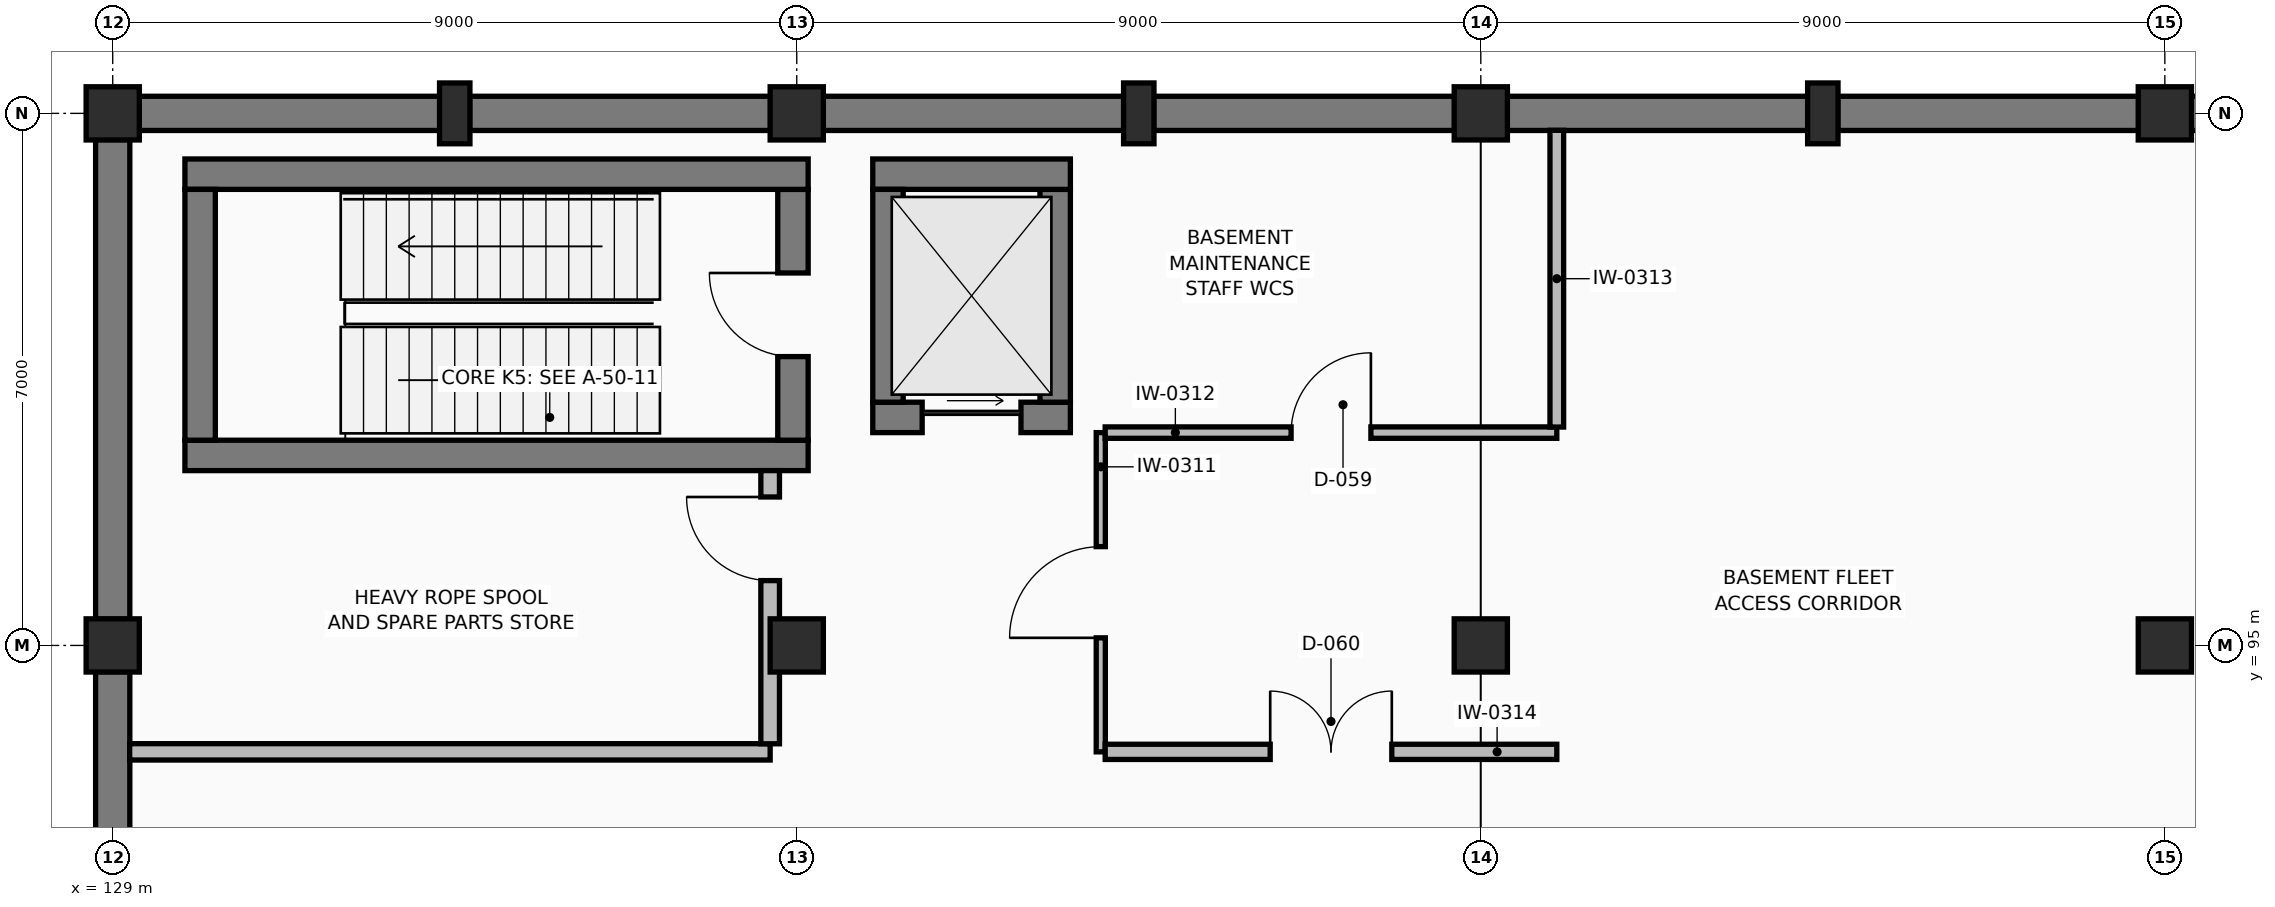
"""IFC4 building model, lengths in metres.
Left out: names, types, materials, properties, quantities, classifications, styles, units other than length and angle.
Written with IfcOpenShell. Run it as: python <this file> out.ifc"""

import sys

from ifc_helpers import new_model, si_unit, direction, frame, frame_2d, origin, origin_2d, place, context, subcontext, project, spatial, rectangle, extrude, element, fill, save


model = new_model("IFC4")
c1 = context("Model", 3, precision=1e-05, world=origin(), true_north=direction((0.0, 1.0)))
c2 = subcontext(c1, "Body", "Model", "MODEL_VIEW")
j1 = project(units=[si_unit("LENGTHUNIT", "METRE"), si_unit("PLANEANGLEUNIT", "RADIAN")], contexts=[c1])
p1 = place(None, origin())
s1 = spatial("IfcSite", under=j1, at=p1, CompositionType="ELEMENT")
p2 = place(p1, origin())
s2 = spatial("IfcBuilding", under=s1, at=p2, CompositionType="ELEMENT")
p3 = place(p2, frame((0.0, 0.0, -4.5)))
s3 = spatial("IfcBuildingStorey", under=s2, at=p3, CompositionType="ELEMENT", Elevation=-4.5)
for number, where, z_axis, x_axis in (
    (1, (129.0, 95.0, 0.0), (0.0, 0.0, 1.0), (1.0, 0.0, 0.0)),
    (2, (129.0, 102.0, 0.0), (0.0, 0.0, 1.0), (1.0, 0.0, 0.0)),
    (3, (138.0, 95.0, 0.0), (0.0, 0.0, 1.0), (1.0, 0.0, 0.0)),
    (4, (138.0, 102.0, 0.0), (0.0, 0.0, 1.0), (1.0, 0.0, 0.0)),
    (5, (147.0, 95.0, 0.0), (0.0, 0.0, 1.0), (1.0, 0.0, 0.0)),
    (6, (147.0, 102.0, 0.0), (0.0, 0.0, 1.0), (1.0, 0.0, 0.0)),
    (7, (156.0, 95.0, 0.0), (0.0, 0.0, 1.0), (1.0, 0.0, 0.0)),
    (8, (156.0, 102.0, 0.0), (0.0, 0.0, 1.0), (1.0, 0.0, 0.0)),
):
    element("IfcColumn", number, at=place(p3, frame(where, z_axis=z_axis, x_axis=x_axis)), inside=s3, PredefinedType="COLUMN", context=c2, shape_type="SweptSolid", body=[
        extrude(rectangle(XDim=0.7, YDim=0.7, at=origin_2d()), origin(), (0.0, 0.0, 1.0), 4.5),
    ])
for number, where, z_axis, x_axis in (
    (9, (133.5, 102.0, 0.0), (0.0, 0.0, 1.0), (1.0, 0.0, 0.0)),
    (10, (142.5, 102.0, 0.0), (0.0, 0.0, 1.0), (1.0, 0.0, 0.0)),
    (11, (151.5, 102.0, 0.0), (0.0, 0.0, 1.0), (1.0, 0.0, 0.0)),
):
    element("IfcColumn", number, at=place(p3, frame(where, z_axis=z_axis, x_axis=x_axis)), inside=s3, PredefinedType="PILASTER", context=c2, shape_type="SweptSolid", body=[
        extrude(rectangle(XDim=0.4, YDim=0.8, at=origin_2d()), origin(), (0.0, 0.0, 1.0), 4.5),
    ])
for number, where, z_axis, x_axis in (
    (12, (160.305, 102.0, 0.0), (0.0, 0.0, 1.0), (-1.0, 0.0, 0.0)),
    (13, (155.655, 102.0, 0.0), (0.0, 0.0, 1.0), (-1.0, 0.0, 0.0)),
    (14, (151.305, 102.0, 0.0), (0.0, 0.0, 1.0), (-1.0, 0.0, 0.0)),
    (15, (146.655, 102.0, 0.0), (0.0, 0.0, 1.0), (-1.0, 0.0, 0.0)),
    (16, (142.305, 102.0, 0.0), (0.0, 0.0, 1.0), (-1.0, 0.0, 0.0)),
    (17, (137.655, 102.0, 0.0), (0.0, 0.0, 1.0), (-1.0, 0.0, 0.0)),
    (18, (133.305, 102.0, 0.0), (0.0, 0.0, 1.0), (-1.0, 0.0, 0.0)),
):
    element("IfcWall", number, at=place(p3, frame(where, z_axis=z_axis, x_axis=x_axis)), inside=s3, PredefinedType="USERDEFINED", context=c2, shape_type="SweptSolid", body=[
        extrude(rectangle(XDim=3.96, YDim=0.45, at=frame_2d((1.98, 0.0))), origin(), (0.0, 0.0, 1.0), 3.775),
    ])
p4 = place(p3, frame((129.0, 101.655, 0.0), z_axis=(0.0, 0.0, 1.0), x_axis=(0.0, -1.0, 0.0)))
e19 = element("IfcWall", 19, at=p4, inside=s3, PredefinedType="USERDEFINED", context=c2, shape_type="SweptSolid", body=[
    extrude(rectangle(XDim=6.31, YDim=0.45, at=frame_2d((3.155, 0.0))), origin(), (0.0, 0.0, 1.0), 3.775),
])
p5 = place(p3, frame((129.0, 94.655, 0.0), z_axis=(0.0, 0.0, 1.0), x_axis=(0.0, -1.0, 0.0)))
e20 = element("IfcWall", 20, at=p5, inside=s3, PredefinedType="USERDEFINED", context=c2, shape_type="SweptSolid", body=[
    extrude(rectangle(XDim=3.96, YDim=0.45, at=frame_2d((1.98, 0.0))), origin(), (0.0, 0.0, 1.0), 3.775),
])
p6 = place(p3, frame((129.95, 97.5, 0.0), z_axis=(0.0, 0.0, 1.0), x_axis=(1.0, 0.0, 0.0)))
e21 = element("IfcWall", 21, at=p6, inside=s3, PredefinedType="SHEAR", context=c2, shape_type="SweptSolid", body=[
    extrude(rectangle(XDim=8.2, YDim=0.4, at=frame_2d((4.1, 0.0))), origin(), (0.0, 0.0, 1.0), 4.19),
])
p7 = place(p3, frame((137.95, 97.7, 0.0), z_axis=(0.0, 0.0, 1.0), x_axis=(0.0, 1.0, 0.0)))
e22 = element("IfcWall", 22, at=p7, inside=s3, PredefinedType="SHEAR", context=c2, shape_type="SweptSolid", body=[
    extrude(rectangle(XDim=3.3, YDim=0.4, at=frame_2d((1.65, 0.0))), origin(), (0.0, 0.0, 1.0), 4.19),
])
p8 = place(p7, frame((1.1, 0.0, 0.0)))
e23 = element("IfcOpeningElement", 23, at=p8, cuts=e22, PredefinedType="OPENING", context=c2, shape_type="SweptSolid", body=[
    extrude(rectangle(XDim=1.1, YDim=2.2, at=frame_2d((0.55, 1.1))), frame((0.0, 0.21, 0.0), z_axis=(0.0, -1.0, 0.0), x_axis=(1.0, 0.0, 0.0)), (0.0, 0.0, 1.0), 0.42),
])
p9 = place(p3, frame((138.15, 101.2, 0.0), z_axis=(0.0, 0.0, 1.0), x_axis=(-1.0, 0.0, 0.0)))
e24 = element("IfcWall", 24, at=p9, inside=s3, PredefinedType="SHEAR", context=c2, shape_type="SweptSolid", body=[
    extrude(rectangle(XDim=8.2, YDim=0.4, at=frame_2d((4.1, 0.0))), origin(), (0.0, 0.0, 1.0), 4.19),
])
p10 = place(p3, frame((130.15, 101.0, 0.0), z_axis=(0.0, 0.0, 1.0), x_axis=(0.0, -1.0, 0.0)))
e25 = element("IfcWall", 25, at=p10, inside=s3, PredefinedType="SHEAR", context=c2, shape_type="SweptSolid", body=[
    extrude(rectangle(XDim=3.3, YDim=0.4, at=frame_2d((1.65, 0.0))), origin(), (0.0, 0.0, 1.0), 4.19),
])
p11 = place(p3, frame((139.0, 98.0, 0.0), z_axis=(0.0, 0.0, 1.0), x_axis=(1.0, 0.0, 0.0)))
e26 = element("IfcWall", 26, at=p11, inside=s3, PredefinedType="SHEAR", context=c2, shape_type="SweptSolid", body=[
    extrude(rectangle(XDim=2.6, YDim=0.4, at=frame_2d((1.3, 0.0))), origin(), (0.0, 0.0, 1.0), 4.19),
])
p12 = place(p11, frame((0.65, 0.0, 0.0)))
e27 = element("IfcOpeningElement", 27, at=p12, cuts=e26, PredefinedType="OPENING", context=c2, shape_type="SweptSolid", body=[
    extrude(rectangle(XDim=1.3, YDim=2.25, at=frame_2d((0.65, 1.125))), frame((0.0, 0.21, 0.0), z_axis=(0.0, -1.0, 0.0), x_axis=(1.0, 0.0, 0.0)), (0.0, 0.0, 1.0), 0.42),
])
p13 = place(p3, frame((141.4, 98.2, 0.0), z_axis=(0.0, 0.0, 1.0), x_axis=(0.0, 1.0, 0.0)))
e28 = element("IfcWall", 28, at=p13, inside=s3, PredefinedType="SHEAR", context=c2, shape_type="SweptSolid", body=[
    extrude(rectangle(XDim=2.8, YDim=0.4, at=frame_2d((1.4, 0.0))), origin(), (0.0, 0.0, 1.0), 4.19),
])
p14 = place(p3, frame((141.6, 101.2, 0.0), z_axis=(0.0, 0.0, 1.0), x_axis=(-1.0, 0.0, 0.0)))
e29 = element("IfcWall", 29, at=p14, inside=s3, PredefinedType="SHEAR", context=c2, shape_type="SweptSolid", body=[
    extrude(rectangle(XDim=2.6, YDim=0.4, at=frame_2d((1.3, 0.0))), origin(), (0.0, 0.0, 1.0), 4.19),
])
p15 = place(p3, frame((139.2, 101.0, 0.0), z_axis=(0.0, 0.0, 1.0), x_axis=(0.0, -1.0, 0.0)))
e30 = element("IfcWall", 30, at=p15, inside=s3, PredefinedType="SHEAR", context=c2, shape_type="SweptSolid", body=[
    extrude(rectangle(XDim=2.8, YDim=0.4, at=frame_2d((1.4, 0.0))), origin(), (0.0, 0.0, 1.0), 4.19),
])
p16 = place(p3, frame((129.223, 93.6, 0.0), z_axis=(0.0, 0.0, 1.0), x_axis=(1.0, 0.0, 0.0)))
e31 = element("IfcWall", 31, at=p16, inside=s3, PredefinedType="PARTITIONING", context=c2, shape_type="SweptSolid", body=[
    extrude(rectangle(XDim=8.427, YDim=0.215, at=frame_2d((4.213, 0.0))), origin(), (0.0, 0.0, 1.0), 4.135),
])
p17 = place(p3, frame((137.65, 93.706, 0.0), z_axis=(0.0, 0.0, 1.0), x_axis=(0.0, 1.0, 0.0)))
e32 = element("IfcWall", 32, at=p17, inside=s3, PredefinedType="PARTITIONING", context=c2, shape_type="SweptSolid", body=[
    extrude(rectangle(XDim=3.594, YDim=0.245, at=frame_2d((1.797, 0.0))), origin(), (0.0, 0.0, 1.0), 3.363),
])
p18 = place(p17, frame((2.147, 0.0, 0.0)))
e33 = element("IfcOpeningElement", 33, at=p18, cuts=e32, PredefinedType="OPENING", context=c2, shape_type="SweptSolid", body=[
    extrude(rectangle(XDim=1.1, YDim=2.2, at=frame_2d((0.55, 1.1))), frame((0.0, 0.133, 0.0), z_axis=(0.0, -1.0, 0.0), x_axis=(1.0, 0.0, 0.0)), (0.0, 0.0, 1.0), 0.265),
])
p19 = place(p3, frame((142.0, 93.6, 0.0), z_axis=(0.0, 0.0, 1.0), x_axis=(0.0, 1.0, 0.0)))
e34 = element("IfcWall", 34, at=p19, inside=s3, PredefinedType="PARTITIONING", context=c2, shape_type="SweptSolid", body=[
    extrude(rectangle(XDim=4.2, YDim=0.12, at=frame_2d((2.1, 0.0))), origin(), (0.0, 0.0, 1.0), 3.363),
])
p20 = place(p19, frame((1.5, 0.0, 0.0)))
e35 = element("IfcOpeningElement", 35, at=p20, cuts=e34, PredefinedType="OPENING", context=c2, shape_type="SweptSolid", body=[
    extrude(rectangle(XDim=1.2, YDim=2.2, at=frame_2d((0.6, 1.1))), frame((0.0, 0.07, 0.0), z_axis=(0.0, -1.0, 0.0), x_axis=(1.0, 0.0, 0.0)), (0.0, 0.0, 1.0), 0.14),
])
p21 = place(p3, frame((142.058, 97.8, 0.0), z_axis=(0.0, 0.0, 1.0), x_axis=(1.0, 0.0, 0.0)))
e36 = element("IfcWall", 36, at=p21, inside=s3, PredefinedType="PARTITIONING", context=c2, shape_type="SweptSolid", body=[
    extrude(rectangle(XDim=5.942, YDim=0.15, at=frame_2d((2.971, 0.0))), origin(), (0.0, 0.0, 1.0), 3.363),
])
p22 = place(p21, frame((2.446, 0.0, 0.0)))
e37 = element("IfcOpeningElement", 37, at=p22, cuts=e36, PredefinedType="OPENING", context=c2, shape_type="SweptSolid", body=[
    extrude(rectangle(XDim=1.05, YDim=2.15, at=frame_2d((0.525, 1.075))), frame((0.0, 0.085, 0.0), z_axis=(0.0, -1.0, 0.0), x_axis=(1.0, 0.0, 0.0)), (0.0, 0.0, 1.0), 0.17),
])
p23 = place(p3, frame((148.0, 97.873, 0.0), z_axis=(0.0, 0.0, 1.0), x_axis=(0.0, 1.0, 0.0)))
e38 = element("IfcWall", 38, at=p23, inside=s3, PredefinedType="STANDARD", context=c2, shape_type="SweptSolid", body=[
    extrude(rectangle(XDim=3.904, YDim=0.18, at=frame_2d((1.952, 0.0))), origin(), (0.0, 0.0, 1.0), 4.135),
])
p24 = place(p3, frame((142.058, 93.6, 0.0), z_axis=(0.0, 0.0, 1.0), x_axis=(1.0, 0.0, 0.0)))
e39 = element("IfcWall", 39, at=p24, inside=s3, PredefinedType="PARTITIONING", context=c2, shape_type="SweptSolid", body=[
    extrude(rectangle(XDim=5.942, YDim=0.2, at=frame_2d((2.971, 0.0))), origin(), (0.0, 0.0, 1.0), 3.363),
])
p25 = place(p24, frame((2.171, 0.0, 0.0)))
e40 = element("IfcOpeningElement", 40, at=p25, cuts=e39, PredefinedType="OPENING", context=c2, shape_type="SweptSolid", body=[
    extrude(rectangle(XDim=1.6, YDim=2.25, at=frame_2d((0.8, 1.125))), frame((0.0, 0.11, 0.0), z_axis=(0.0, -1.0, 0.0), x_axis=(1.0, 0.0, 0.0)), (0.0, 0.0, 1.0), 0.22),
])
p26 = place(p8, origin())
e41 = element("IfcDoor", 41, at=p26, inside=s3, OperationType="SINGLE_SWING_RIGHT", PredefinedType="DOOR", context=c2, shape_type="SweptSolid", body=[
    extrude(rectangle(XDim=1.1, YDim=2.2, at=frame_2d((0.55, 1.1))), frame((0.0, 0.025, 0.0), z_axis=(0.0, -1.0, 0.0), x_axis=(1.0, 0.0, 0.0)), (0.0, 0.0, 1.0), 0.05),
])
fill(e23, e41)
p27 = place(p12, origin())
e42 = element("IfcDoor", 42, at=p27, inside=s3, OperationType="SLIDING_TO_RIGHT", PredefinedType="DOOR", context=c2, shape_type="SweptSolid", body=[
    extrude(rectangle(XDim=1.3, YDim=2.25, at=frame_2d((0.65, 1.125))), frame((0.0, 0.025, 0.0), z_axis=(0.0, -1.0, 0.0), x_axis=(1.0, 0.0, 0.0)), (0.0, 0.0, 1.0), 0.05),
])
fill(e27, e42)
p28 = place(p18, origin())
e43 = element("IfcDoor", 43, at=p28, inside=s3, OperationType="SINGLE_SWING_RIGHT", PredefinedType="DOOR", context=c2, shape_type="SweptSolid", body=[
    extrude(rectangle(XDim=1.1, YDim=2.2, at=frame_2d((0.55, 1.1))), frame((0.0, 0.025, 0.0), z_axis=(0.0, -1.0, 0.0), x_axis=(1.0, 0.0, 0.0)), (0.0, 0.0, 1.0), 0.05),
])
fill(e33, e43)
p29 = place(p20, origin())
e44 = element("IfcDoor", 44, at=p29, inside=s3, OperationType="SINGLE_SWING_LEFT", PredefinedType="DOOR", context=c2, shape_type="SweptSolid", body=[
    extrude(rectangle(XDim=1.2, YDim=2.2, at=frame_2d((0.6, 1.1))), frame((0.0, 0.025, 0.0), z_axis=(0.0, -1.0, 0.0), x_axis=(1.0, 0.0, 0.0)), (0.0, 0.0, 1.0), 0.05),
])
fill(e35, e44)
p30 = place(p22, origin())
e45 = element("IfcDoor", 45, at=p30, inside=s3, OperationType="SINGLE_SWING_RIGHT", PredefinedType="DOOR", context=c2, shape_type="SweptSolid", body=[
    extrude(rectangle(XDim=1.05, YDim=2.15, at=frame_2d((0.525, 1.075))), frame((0.0, 0.025, 0.0), z_axis=(0.0, -1.0, 0.0), x_axis=(1.0, 0.0, 0.0)), (0.0, 0.0, 1.0), 0.05),
])
fill(e37, e45)
p31 = place(p25, origin())
e46 = element("IfcDoor", 46, at=p31, inside=s3, OperationType="DOUBLE_SWING_LEFT", PredefinedType="DOOR", context=c2, shape_type="SweptSolid", body=[
    extrude(rectangle(XDim=1.6, YDim=2.25, at=frame_2d((0.8, 1.125))), frame((0.0, 0.025, 0.0), z_axis=(0.0, -1.0, 0.0), x_axis=(1.0, 0.0, 0.0)), (0.0, 0.0, 1.0), 0.05),
])
fill(e40, e46)
save(model, sys.argv[1])
